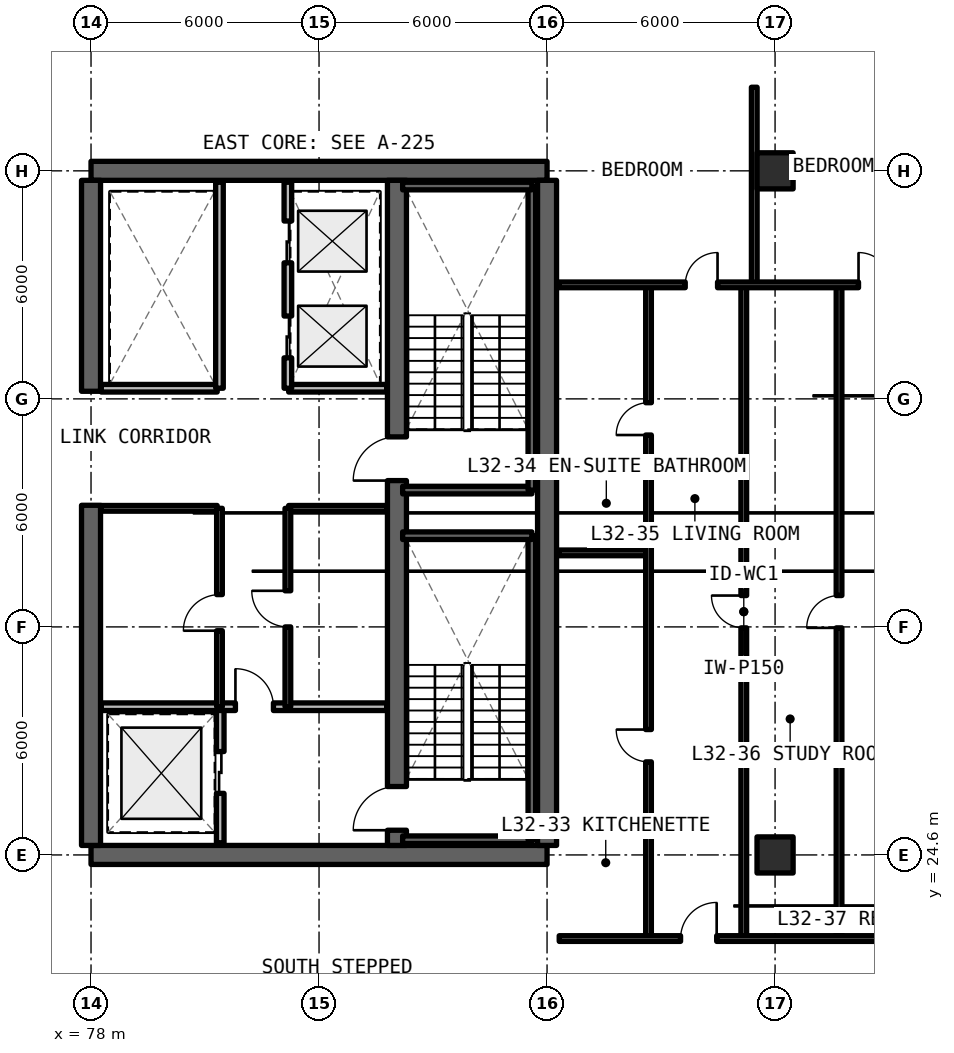
"""IFC4 building model, lengths in metres.
Left out: names, types, materials, properties, quantities, classifications, styles, units other than length and angle.
Written with IfcOpenShell. Run it as: python <this file> out.ifc"""

import sys

from ifc_helpers import new_model, si_unit, direction, frame, frame_2d, origin, origin_2d, place, context, subcontext, project, spatial, rectangle, extrude, element, fill, save


model = new_model("IFC4")
c1 = context("Model", 3, precision=1e-05, world=origin(), true_north=direction((0.0, 1.0)))
c2 = subcontext(c1, "Body", "Model", "MODEL_VIEW")
j1 = project(units=[si_unit("LENGTHUNIT", "METRE"), si_unit("PLANEANGLEUNIT", "RADIAN")], contexts=[c1])
p1 = place(None, origin())
s1 = spatial("IfcSite", under=j1, at=p1, CompositionType="ELEMENT")
p2 = place(p1, origin())
s2 = spatial("IfcBuilding", under=s1, at=p2, CompositionType="ELEMENT")
p3 = place(p2, frame((0.0, 0.0, 115.83)))
s3 = spatial("IfcBuildingStorey", under=s2, at=p3, CompositionType="ELEMENT", Elevation=115.83)
for number, where, z_axis, x_axis in (
    (1, (78.0, 24.6, 0.0), (0.0, 0.0, 1.0), (1.0, 0.0, 0.0)),
    (2, (90.0, 42.6, 0.0), (0.0, 0.0, 1.0), (-1.0, 0.0, 0.0)),
):
    element("IfcWall", number, at=place(p3, frame(where, z_axis=z_axis, x_axis=x_axis)), inside=s3, PredefinedType="SHEAR", context=c2, shape_type="SweptSolid", body=[
        extrude(rectangle(XDim=12.0, YDim=0.5, at=frame_2d((6.0, 0.0))), origin(), (0.0, 0.0, 1.0), 3.63),
    ])
p4 = place(p3, frame((90.0, 24.85, 0.0), z_axis=(0.0, 0.0, 1.0), x_axis=(0.0, 1.0, 0.0)))
e3 = element("IfcWall", 3, at=p4, inside=s3, PredefinedType="SHEAR", context=c2, shape_type="SweptSolid", body=[
    extrude(rectangle(XDim=17.5, YDim=0.5, at=frame_2d((8.75, 0.0))), origin(), (0.0, 0.0, 1.0), 3.63),
])
p5 = place(p3, frame((78.0, 24.85, 0.0), z_axis=(0.0, 0.0, 1.0), x_axis=(0.0, 1.0, 0.0)))
e4 = element("IfcWall", 4, at=p5, inside=s3, PredefinedType="SHEAR", context=c2, shape_type="SweptSolid", body=[
    extrude(rectangle(XDim=8.95, YDim=0.5, at=frame_2d((4.475, 0.0))), origin(), (0.0, 0.0, 1.0), 3.63),
])
p6 = place(p3, frame((78.0, 36.8, 0.0), z_axis=(0.0, 0.0, 1.0), x_axis=(0.0, 1.0, 0.0)))
e5 = element("IfcWall", 5, at=p6, inside=s3, PredefinedType="SHEAR", context=c2, shape_type="SweptSolid", body=[
    extrude(rectangle(XDim=5.55, YDim=0.5, at=frame_2d((2.775, 0.0))), origin(), (0.0, 0.0, 1.0), 3.63),
])
p7 = place(p3, frame((86.05, 24.85, 0.0), z_axis=(0.0, 0.0, 1.0), x_axis=(0.0, 1.0, 0.0)))
e6 = element("IfcWall", 6, at=p7, inside=s3, PredefinedType="SHEAR", context=c2, shape_type="SweptSolid", body=[
    extrude(rectangle(XDim=17.5, YDim=0.5, at=frame_2d((8.75, 0.0))), origin(), (0.0, 0.0, 1.0), 3.63),
])
p8 = place(p7, frame((0.4, 0.0, 0.0)))
e7 = element("IfcOpeningElement", 7, at=p8, cuts=e6, PredefinedType="OPENING", context=c2, shape_type="SweptSolid", body=[
    extrude(rectangle(XDim=1.15, YDim=2.15, at=frame_2d((0.575, 1.075))), frame((0.0, 0.26, 0.0), z_axis=(0.0, -1.0, 0.0), x_axis=(1.0, 0.0, 0.0)), (0.0, 0.0, 1.0), 0.52),
])
p9 = place(p7, frame((9.6, 0.0, 0.0)))
e8 = element("IfcOpeningElement", 8, at=p9, cuts=e6, PredefinedType="OPENING", context=c2, shape_type="SweptSolid", body=[
    extrude(rectangle(XDim=1.15, YDim=2.15, at=frame_2d((0.575, 1.075))), frame((0.0, 0.26, 0.0), z_axis=(0.0, -1.0, 0.0), x_axis=(1.0, 0.0, 0.0)), (0.0, 0.0, 1.0), 0.52),
])
for number, where, z_axis, x_axis in (
    (9, (96.0, 24.6, 0.0), (0.0, 0.0, 1.0), (1.0, 0.0, 0.0)),
    (10, (96.0, 42.6, 0.0), (0.0, 0.0, 1.0), (1.0, 0.0, 0.0)),
):
    element("IfcColumn", number, at=place(p3, frame(where, z_axis=z_axis, x_axis=x_axis)), inside=s3, PredefinedType="COLUMN", context=c2, shape_type="SweptSolid", body=[
        extrude(rectangle(XDim=0.95, YDim=0.95, at=origin_2d()), origin(), (0.0, 0.0, 1.0), 3.63),
    ])
p10 = place(p3, frame((81.4, 24.92, 0.0), z_axis=(0.0, 0.0, 1.0), x_axis=(0.0, 1.0, 0.0)))
e11 = element("IfcWall", 11, at=p10, inside=s3, PredefinedType="SOLIDWALL", context=c2, shape_type="SweptSolid", body=[
    extrude(rectangle(XDim=3.58, YDim=0.2, at=frame_2d((1.79, 0.0))), origin(), (0.0, 0.0, 1.0), 2.63),
])
p11 = place(p10, frame((1.3, 0.0, 0.0)))
e12 = element("IfcOpeningElement", 12, at=p11, cuts=e11, PredefinedType="OPENING", context=c2, shape_type="SweptSolid", body=[
    extrude(rectangle(XDim=1.1, YDim=2.2, at=frame_2d((0.55, 1.1))), frame((0.0, 0.11, 0.0), z_axis=(0.0, -1.0, 0.0), x_axis=(1.0, 0.0, 0.0)), (0.0, 0.0, 1.0), 0.22),
])
p12 = place(p3, frame((78.27, 28.5, 0.0), z_axis=(0.0, 0.0, 1.0), x_axis=(1.0, 0.0, 0.0)))
e13 = element("IfcWall", 13, at=p12, inside=s3, PredefinedType="SOLIDWALL", context=c2, shape_type="SweptSolid", body=[
    extrude(rectangle(XDim=7.51, YDim=0.2, at=frame_2d((3.755, 0.0))), origin(), (0.0, 0.0, 1.0), 2.63),
])
p13 = place(p12, frame((3.53, 0.0, 0.0)))
e14 = element("IfcOpeningElement", 14, at=p13, cuts=e13, PredefinedType="OPENING", context=c2, shape_type="SweptSolid", body=[
    extrude(rectangle(XDim=1.0, YDim=2.15, at=frame_2d((0.5, 1.075))), frame((0.0, 0.11, 0.0), z_axis=(0.0, -1.0, 0.0), x_axis=(1.0, 0.0, 0.0)), (0.0, 0.0, 1.0), 0.22),
])
p14 = place(p3, frame((83.2, 33.72, 0.0), z_axis=(0.0, 0.0, 1.0), x_axis=(1.0, 0.0, 0.0)))
e15 = element("IfcWall", 15, at=p14, inside=s3, PredefinedType="SOLIDWALL", context=c2, shape_type="SweptSolid", body=[
    extrude(rectangle(XDim=2.58, YDim=0.15, at=frame_2d((1.29, 0.0))), origin(), (0.0, 0.0, 1.0), 2.63),
])
p15 = place(p3, frame((83.18, 28.5, 0.0), z_axis=(0.0, 0.0, 1.0), x_axis=(0.0, 1.0, 0.0)))
e16 = element("IfcWall", 16, at=p15, inside=s3, PredefinedType="SOLIDWALL", context=c2, shape_type="SweptSolid", body=[
    extrude(rectangle(XDim=5.22, YDim=0.15, at=frame_2d((2.61, 0.0))), origin(), (0.0, 0.0, 1.0), 2.63),
])
p16 = place(p15, frame((2.1, 0.0, 0.0)))
e17 = element("IfcOpeningElement", 17, at=p16, cuts=e16, PredefinedType="OPENING", context=c2, shape_type="SweptSolid", body=[
    extrude(rectangle(XDim=0.95, YDim=2.15, at=frame_2d((0.475, 1.075))), frame((0.0, 0.085, 0.0), z_axis=(0.0, -1.0, 0.0), x_axis=(1.0, 0.0, 0.0)), (0.0, 0.0, 1.0), 0.17),
])
p17 = place(p3, frame((78.27, 33.72, 0.0), z_axis=(0.0, 0.0, 1.0), x_axis=(1.0, 0.0, 0.0)))
e18 = element("IfcWall", 18, at=p17, inside=s3, PredefinedType="SOLIDWALL", context=c2, shape_type="SweptSolid", body=[
    extrude(rectangle(XDim=3.05, YDim=0.15, at=frame_2d((1.525, 0.0))), origin(), (0.0, 0.0, 1.0), 2.63),
])
p18 = place(p3, frame((81.38, 28.5, 0.0), z_axis=(0.0, 0.0, 1.0), x_axis=(0.0, 1.0, 0.0)))
e19 = element("IfcWall", 19, at=p18, inside=s3, PredefinedType="SOLIDWALL", context=c2, shape_type="SweptSolid", body=[
    extrude(rectangle(XDim=5.22, YDim=0.15, at=frame_2d((2.61, 0.0))), origin(), (0.0, 0.0, 1.0), 2.63),
])
p19 = place(p18, frame((2.0, 0.0, 0.0)))
e20 = element("IfcOpeningElement", 20, at=p19, cuts=e19, PredefinedType="OPENING", context=c2, shape_type="SweptSolid", body=[
    extrude(rectangle(XDim=0.95, YDim=2.15, at=frame_2d((0.475, 1.075))), frame((0.0, 0.085, 0.0), z_axis=(0.0, -1.0, 0.0), x_axis=(1.0, 0.0, 0.0)), (0.0, 0.0, 1.0), 0.17),
])
p20 = place(p3, frame((83.2, 36.88, 0.0), z_axis=(0.0, 0.0, 1.0), x_axis=(1.0, 0.0, 0.0)))
e21 = element("IfcWall", 21, at=p20, inside=s3, PredefinedType="SOLIDWALL", context=c2, shape_type="SweptSolid", body=[
    extrude(rectangle(XDim=2.58, YDim=0.2, at=frame_2d((1.29, 0.0))), origin(), (0.0, 0.0, 1.0), 2.63),
])
p21 = place(p3, frame((83.18, 36.88, 0.0), z_axis=(0.0, 0.0, 1.0), x_axis=(0.0, 1.0, 0.0)))
e22 = element("IfcWall", 22, at=p21, inside=s3, PredefinedType="SOLIDWALL", context=c2, shape_type="SweptSolid", body=[
    extrude(rectangle(XDim=5.42, YDim=0.2, at=frame_2d((2.71, 0.0))), origin(), (0.0, 0.0, 1.0), 2.63),
])
p22 = place(p21, frame((0.8, 0.0, 0.0)))
e23 = element("IfcOpeningElement", 23, at=p22, cuts=e22, PredefinedType="OPENING", context=c2, shape_type="SweptSolid", body=[
    extrude(rectangle(XDim=1.1, YDim=2.2, at=frame_2d((0.55, 1.1))), frame((0.0, 0.11, 0.0), z_axis=(0.0, -1.0, 0.0), x_axis=(1.0, 0.0, 0.0)), (0.0, 0.0, 1.0), 0.22),
])
p23 = place(p21, frame((3.3, 0.0, 0.0)))
e24 = element("IfcOpeningElement", 24, at=p23, cuts=e22, PredefinedType="OPENING", context=c2, shape_type="SweptSolid", body=[
    extrude(rectangle(XDim=1.1, YDim=2.2, at=frame_2d((0.55, 1.1))), frame((0.0, 0.11, 0.0), z_axis=(0.0, -1.0, 0.0), x_axis=(1.0, 0.0, 0.0)), (0.0, 0.0, 1.0), 0.22),
])
p24 = place(p3, frame((78.27, 36.88, 0.0), z_axis=(0.0, 0.0, 1.0), x_axis=(1.0, 0.0, 0.0)))
e25 = element("IfcWall", 25, at=p24, inside=s3, PredefinedType="SOLIDWALL", context=c2, shape_type="SweptSolid", body=[
    extrude(rectangle(XDim=3.05, YDim=0.2, at=frame_2d((1.525, 0.0))), origin(), (0.0, 0.0, 1.0), 2.63),
])
p25 = place(p3, frame((81.38, 36.88, 0.0), z_axis=(0.0, 0.0, 1.0), x_axis=(0.0, 1.0, 0.0)))
e26 = element("IfcWall", 26, at=p25, inside=s3, PredefinedType="SOLIDWALL", context=c2, shape_type="SweptSolid", body=[
    extrude(rectangle(XDim=5.42, YDim=0.2, at=frame_2d((2.71, 0.0))), origin(), (0.0, 0.0, 1.0), 2.63),
])
p26 = place(p3, frame((95.177, 22.4, 0.0), z_axis=(0.0, 0.0, 1.0), x_axis=(0.0, 1.0, 0.0)))
e27 = element("IfcWall", 27, at=p26, inside=s3, PredefinedType="PARTITIONING", context=c2, shape_type="SweptSolid", body=[
    extrude(rectangle(XDim=17.2, YDim=0.15, at=frame_2d((8.6, 0.0))), origin(), (0.0, 0.0, 1.0), 2.63),
])
p27 = place(p26, frame((8.175, 0.0, 0.0)))
e28 = element("IfcOpeningElement", 28, at=p27, cuts=e27, PredefinedType="OPENING", context=c2, shape_type="SweptSolid", body=[
    extrude(rectangle(XDim=0.85, YDim=2.1, at=frame_2d((0.425, 1.05))), frame((0.0, 0.085, 0.0), z_axis=(0.0, -1.0, 0.0), x_axis=(1.0, 0.0, 0.0)), (0.0, 0.0, 1.0), 0.17),
])
p28 = place(p3, frame((97.683, 22.4, 0.0), z_axis=(0.0, 0.0, 1.0), x_axis=(0.0, 1.0, 0.0)))
e29 = element("IfcWall", 29, at=p28, inside=s3, PredefinedType="PARTITIONING", context=c2, shape_type="SweptSolid", body=[
    extrude(rectangle(XDim=17.2, YDim=0.15, at=frame_2d((8.6, 0.0))), origin(), (0.0, 0.0, 1.0), 2.63),
])
p29 = place(p28, frame((8.175, 0.0, 0.0)))
e30 = element("IfcOpeningElement", 30, at=p29, cuts=e29, PredefinedType="OPENING", context=c2, shape_type="SweptSolid", body=[
    extrude(rectangle(XDim=0.85, YDim=2.1, at=frame_2d((0.425, 1.05))), frame((0.0, 0.085, 0.0), z_axis=(0.0, -1.0, 0.0), x_axis=(1.0, 0.0, 0.0)), (0.0, 0.0, 1.0), 0.17),
])
p30 = place(p3, frame((90.32, 32.548, 0.0), z_axis=(0.0, 0.0, 1.0), x_axis=(1.0, 0.0, 0.0)))
e31 = element("IfcWall", 31, at=p30, inside=s3, PredefinedType="PARTITIONING", context=c2, shape_type="SweptSolid", body=[
    extrude(rectangle(XDim=2.35, YDim=0.15, at=frame_2d((1.175, 0.0))), origin(), (0.0, 0.0, 1.0), 2.63),
])
p31 = place(p3, frame((92.67, 22.4, 0.0), z_axis=(0.0, 0.0, 1.0), x_axis=(0.0, 1.0, 0.0)))
e32 = element("IfcWall", 32, at=p31, inside=s3, PredefinedType="PARTITIONING", context=c2, shape_type="SweptSolid", body=[
    extrude(rectangle(XDim=17.2, YDim=0.15, at=frame_2d((8.6, 0.0))), origin(), (0.0, 0.0, 1.0), 2.63),
])
p32 = place(p31, frame((4.649, 0.0, 0.0)))
e33 = element("IfcOpeningElement", 33, at=p32, cuts=e32, PredefinedType="OPENING", context=c2, shape_type="SweptSolid", body=[
    extrude(rectangle(XDim=0.85, YDim=2.1, at=frame_2d((0.425, 1.05))), frame((0.0, 0.085, 0.0), z_axis=(0.0, -1.0, 0.0), x_axis=(1.0, 0.0, 0.0)), (0.0, 0.0, 1.0), 0.17),
])
p33 = place(p31, frame((13.249, 0.0, 0.0)))
e34 = element("IfcOpeningElement", 34, at=p33, cuts=e32, PredefinedType="OPENING", context=c2, shape_type="SweptSolid", body=[
    extrude(rectangle(XDim=0.85, YDim=2.1, at=frame_2d((0.425, 1.05))), frame((0.0, 0.085, 0.0), z_axis=(0.0, -1.0, 0.0), x_axis=(1.0, 0.0, 0.0)), (0.0, 0.0, 1.0), 0.17),
])
p34 = place(p3, frame((95.452, 39.6, 0.0), z_axis=(0.0, 0.0, 1.0), x_axis=(0.0, 1.0, 0.0)))
e35 = element("IfcWall", 35, at=p34, inside=s3, PredefinedType="PARTITIONING", context=c2, shape_type="SweptSolid", body=[
    extrude(rectangle(XDim=5.2, YDim=0.15, at=frame_2d((2.6, 0.0))), origin(), (0.0, 0.0, 1.0), 2.63),
])
p35 = place(p3, frame((90.32, 39.6, 0.0), z_axis=(0.0, 0.0, 1.0), x_axis=(1.0, 0.0, 0.0)))
e36 = element("IfcWall", 36, at=p35, inside=s3, PredefinedType="PARTITIONING", context=c2, shape_type="SweptSolid", body=[
    extrude(rectangle(XDim=9.87, YDim=0.15, at=frame_2d((4.935, 0.0))), origin(), (0.0, 0.0, 1.0), 2.63),
])
p36 = place(p35, frame((3.316, 0.0, 0.0)))
e37 = element("IfcOpeningElement", 37, at=p36, cuts=e36, PredefinedType="OPENING", context=c2, shape_type="SweptSolid", body=[
    extrude(rectangle(XDim=0.85, YDim=2.1, at=frame_2d((0.425, 1.05))), frame((0.0, 0.085, 0.0), z_axis=(0.0, -1.0, 0.0), x_axis=(1.0, 0.0, 0.0)), (0.0, 0.0, 1.0), 0.17),
])
p37 = place(p35, frame((7.876, 0.0, 0.0)))
e38 = element("IfcOpeningElement", 38, at=p37, cuts=e36, PredefinedType="OPENING", context=c2, shape_type="SweptSolid", body=[
    extrude(rectangle(XDim=0.85, YDim=2.1, at=frame_2d((0.425, 1.05))), frame((0.0, 0.085, 0.0), z_axis=(0.0, -1.0, 0.0), x_axis=(1.0, 0.0, 0.0)), (0.0, 0.0, 1.0), 0.17),
])
p38 = place(p3, frame((90.32, 22.4, 0.0), z_axis=(0.0, 0.0, 1.0), x_axis=(1.0, 0.0, 0.0)))
e39 = element("IfcWall", 39, at=p38, inside=s3, PredefinedType="SOLIDWALL", context=c2, shape_type="SweptSolid", body=[
    extrude(rectangle(XDim=9.87, YDim=0.15, at=frame_2d((4.935, 0.0))), origin(), (0.0, 0.0, 1.0), 2.63),
])
p39 = place(p38, frame((3.193, 0.0, 0.0)))
e40 = element("IfcOpeningElement", 40, at=p39, cuts=e39, PredefinedType="OPENING", context=c2, shape_type="SweptSolid", body=[
    extrude(rectangle(XDim=0.95, YDim=2.15, at=frame_2d((0.475, 1.075))), frame((0.0, 0.085, 0.0), z_axis=(0.0, -1.0, 0.0), x_axis=(1.0, 0.0, 0.0)), (0.0, 0.0, 1.0), 0.17),
])
p40 = place(p3, frame((86.2, 25.0, 0.0), z_axis=(0.0, 0.0, 1.0), x_axis=(1.0, 0.0, 0.0)))
e41 = element("IfcWall", 41, at=p40, inside=s3, PredefinedType="SOLIDWALL", context=c2, shape_type="SweptSolid", body=[
    extrude(rectangle(XDim=3.4, YDim=0.2, at=frame_2d((1.7, 0.0))), origin(), (0.0, 0.0, 1.0), 3.63),
])
p41 = place(p3, frame((89.6, 25.0, 0.0), z_axis=(0.0, 0.0, 1.0), x_axis=(0.0, 1.0, 0.0)))
e42 = element("IfcWall", 42, at=p41, inside=s3, PredefinedType="SOLIDWALL", context=c2, shape_type="SweptSolid", body=[
    extrude(rectangle(XDim=8.0, YDim=0.2, at=frame_2d((4.0, 0.0))), origin(), (0.0, 0.0, 1.0), 3.63),
])
for number, where, z_axis, x_axis in (
    (43, (89.6, 33.0, 0.0), (0.0, 0.0, 1.0), (-1.0, 0.0, 0.0)),
    (44, (86.2, 34.2, 0.0), (0.0, 0.0, 1.0), (1.0, 0.0, 0.0)),
):
    element("IfcWall", number, at=place(p3, frame(where, z_axis=z_axis, x_axis=x_axis)), inside=s3, PredefinedType="SOLIDWALL", context=c2, shape_type="SweptSolid", body=[
        extrude(rectangle(XDim=3.4, YDim=0.2, at=frame_2d((1.7, 0.0))), origin(), (0.0, 0.0, 1.0), 3.63),
    ])
p42 = place(p3, frame((89.6, 34.2, 0.0), z_axis=(0.0, 0.0, 1.0), x_axis=(0.0, 1.0, 0.0)))
e45 = element("IfcWall", 45, at=p42, inside=s3, PredefinedType="SOLIDWALL", context=c2, shape_type="SweptSolid", body=[
    extrude(rectangle(XDim=8.0, YDim=0.2, at=frame_2d((4.0, 0.0))), origin(), (0.0, 0.0, 1.0), 3.63),
])
p43 = place(p3, frame((89.6, 42.2, 0.0), z_axis=(0.0, 0.0, 1.0), x_axis=(-1.0, 0.0, 0.0)))
e46 = element("IfcWall", 46, at=p43, inside=s3, PredefinedType="SOLIDWALL", context=c2, shape_type="SweptSolid", body=[
    extrude(rectangle(XDim=3.4, YDim=0.2, at=frame_2d((1.7, 0.0))), origin(), (0.0, 0.0, 1.0), 3.63),
])
p44 = place(p11, origin())
e47 = element("IfcDoor", 47, at=p44, inside=s3, OperationType="SLIDING_TO_LEFT", PredefinedType="DOOR", context=c2, shape_type="SweptSolid", body=[
    extrude(rectangle(XDim=1.1, YDim=2.2, at=frame_2d((0.55, 1.1))), frame((0.0, 0.025, 0.0), z_axis=(0.0, -1.0, 0.0), x_axis=(1.0, 0.0, 0.0)), (0.0, 0.0, 1.0), 0.05),
])
fill(e12, e47)
p45 = place(p13, origin())
e48 = element("IfcDoor", 48, at=p45, inside=s3, OperationType="SINGLE_SWING_LEFT", PredefinedType="DOOR", context=c2, shape_type="SweptSolid", body=[
    extrude(rectangle(XDim=1.0, YDim=2.15, at=frame_2d((0.5, 1.075))), frame((0.0, 0.025, 0.0), z_axis=(0.0, -1.0, 0.0), x_axis=(1.0, 0.0, 0.0)), (0.0, 0.0, 1.0), 0.05),
])
fill(e14, e48)
p46 = place(p16, origin())
e49 = element("IfcDoor", 49, at=p46, inside=s3, OperationType="SINGLE_SWING_RIGHT", PredefinedType="DOOR", context=c2, shape_type="SweptSolid", body=[
    extrude(rectangle(XDim=0.95, YDim=2.15, at=frame_2d((0.475, 1.075))), frame((0.0, 0.025, 0.0), z_axis=(0.0, -1.0, 0.0), x_axis=(1.0, 0.0, 0.0)), (0.0, 0.0, 1.0), 0.05),
])
fill(e17, e49)
p47 = place(p19, origin())
e50 = element("IfcDoor", 50, at=p47, inside=s3, OperationType="SINGLE_SWING_LEFT", PredefinedType="DOOR", context=c2, shape_type="SweptSolid", body=[
    extrude(rectangle(XDim=0.95, YDim=2.15, at=frame_2d((0.475, 1.075))), frame((0.0, 0.025, 0.0), z_axis=(0.0, -1.0, 0.0), x_axis=(1.0, 0.0, 0.0)), (0.0, 0.0, 1.0), 0.05),
])
fill(e20, e50)
p48 = place(p22, origin())
e51 = element("IfcDoor", 51, at=p48, inside=s3, OperationType="SLIDING_TO_LEFT", PredefinedType="DOOR", context=c2, shape_type="SweptSolid", body=[
    extrude(rectangle(XDim=1.1, YDim=2.2, at=frame_2d((0.55, 1.1))), frame((0.0, 0.025, 0.0), z_axis=(0.0, -1.0, 0.0), x_axis=(1.0, 0.0, 0.0)), (0.0, 0.0, 1.0), 0.05),
])
fill(e23, e51)
p49 = place(p23, origin())
e52 = element("IfcDoor", 52, at=p49, inside=s3, OperationType="SLIDING_TO_RIGHT", PredefinedType="DOOR", context=c2, shape_type="SweptSolid", body=[
    extrude(rectangle(XDim=1.1, YDim=2.2, at=frame_2d((0.55, 1.1))), frame((0.0, 0.025, 0.0), z_axis=(0.0, -1.0, 0.0), x_axis=(1.0, 0.0, 0.0)), (0.0, 0.0, 1.0), 0.05),
])
fill(e24, e52)
p50 = place(p27, origin())
e53 = element("IfcDoor", 53, at=p50, inside=s3, OperationType="SINGLE_SWING_RIGHT", PredefinedType="DOOR", context=c2, shape_type="SweptSolid", body=[
    extrude(rectangle(XDim=0.85, YDim=2.1, at=frame_2d((0.425, 1.05))), frame((0.0, 0.025, 0.0), z_axis=(0.0, -1.0, 0.0), x_axis=(1.0, 0.0, 0.0)), (0.0, 0.0, 1.0), 0.05),
])
fill(e28, e53)
p51 = place(p29, origin())
e54 = element("IfcDoor", 54, at=p51, inside=s3, OperationType="SINGLE_SWING_LEFT", PredefinedType="DOOR", context=c2, shape_type="SweptSolid", body=[
    extrude(rectangle(XDim=0.85, YDim=2.1, at=frame_2d((0.425, 1.05))), frame((0.0, 0.025, 0.0), z_axis=(0.0, -1.0, 0.0), x_axis=(1.0, 0.0, 0.0)), (0.0, 0.0, 1.0), 0.05),
])
fill(e30, e54)
p52 = place(p32, origin())
e55 = element("IfcDoor", 55, at=p52, inside=s3, OperationType="SINGLE_SWING_RIGHT", PredefinedType="DOOR", context=c2, shape_type="SweptSolid", body=[
    extrude(rectangle(XDim=0.85, YDim=2.1, at=frame_2d((0.425, 1.05))), frame((0.0, 0.025, 0.0), z_axis=(0.0, -1.0, 0.0), x_axis=(1.0, 0.0, 0.0)), (0.0, 0.0, 1.0), 0.05),
])
fill(e33, e55)
p53 = place(p33, origin())
e56 = element("IfcDoor", 56, at=p53, inside=s3, OperationType="SINGLE_SWING_LEFT", PredefinedType="DOOR", context=c2, shape_type="SweptSolid", body=[
    extrude(rectangle(XDim=0.85, YDim=2.1, at=frame_2d((0.425, 1.05))), frame((0.0, 0.025, 0.0), z_axis=(0.0, -1.0, 0.0), x_axis=(1.0, 0.0, 0.0)), (0.0, 0.0, 1.0), 0.05),
])
fill(e34, e56)
p54 = place(p36, origin())
e57 = element("IfcDoor", 57, at=p54, inside=s3, OperationType="SINGLE_SWING_RIGHT", PredefinedType="DOOR", context=c2, shape_type="SweptSolid", body=[
    extrude(rectangle(XDim=0.85, YDim=2.1, at=frame_2d((0.425, 1.05))), frame((0.0, 0.025, 0.0), z_axis=(0.0, -1.0, 0.0), x_axis=(1.0, 0.0, 0.0)), (0.0, 0.0, 1.0), 0.05),
])
fill(e37, e57)
p55 = place(p37, origin())
e58 = element("IfcDoor", 58, at=p55, inside=s3, OperationType="SINGLE_SWING_LEFT", PredefinedType="DOOR", context=c2, shape_type="SweptSolid", body=[
    extrude(rectangle(XDim=0.85, YDim=2.1, at=frame_2d((0.425, 1.05))), frame((0.0, 0.025, 0.0), z_axis=(0.0, -1.0, 0.0), x_axis=(1.0, 0.0, 0.0)), (0.0, 0.0, 1.0), 0.05),
])
fill(e38, e58)
p56 = place(p39, origin())
e59 = element("IfcDoor", 59, at=p56, inside=s3, OperationType="SINGLE_SWING_RIGHT", PredefinedType="DOOR", context=c2, shape_type="SweptSolid", body=[
    extrude(rectangle(XDim=0.95, YDim=2.15, at=frame_2d((0.475, 1.075))), frame((0.0, 0.025, 0.0), z_axis=(0.0, -1.0, 0.0), x_axis=(1.0, 0.0, 0.0)), (0.0, 0.0, 1.0), 0.05),
])
fill(e40, e59)
p57 = place(p8, origin())
e60 = element("IfcDoor", 60, at=p57, inside=s3, OperationType="SINGLE_SWING_LEFT", PredefinedType="DOOR", context=c2, shape_type="SweptSolid", body=[
    extrude(rectangle(XDim=1.15, YDim=2.15, at=frame_2d((0.575, 1.075))), frame((0.0, 0.025, 0.0), z_axis=(0.0, -1.0, 0.0), x_axis=(1.0, 0.0, 0.0)), (0.0, 0.0, 1.0), 0.05),
])
fill(e7, e60)
p58 = place(p9, origin())
e61 = element("IfcDoor", 61, at=p58, inside=s3, OperationType="SINGLE_SWING_RIGHT", PredefinedType="DOOR", context=c2, shape_type="SweptSolid", body=[
    extrude(rectangle(XDim=1.15, YDim=2.15, at=frame_2d((0.575, 1.075))), frame((0.0, 0.025, 0.0), z_axis=(0.0, -1.0, 0.0), x_axis=(1.0, 0.0, 0.0)), (0.0, 0.0, 1.0), 0.05),
])
fill(e8, e61)
save(model, sys.argv[1])
